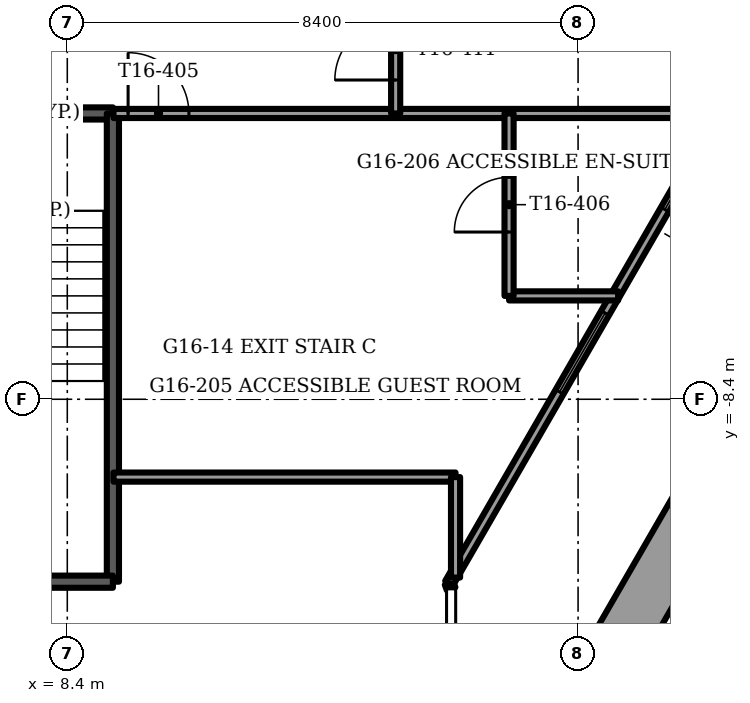
"""IFC4 building model, lengths in metres.
Left out: names, types, materials, properties, quantities, classifications, styles, units other than length and angle.
Written with IfcOpenShell. Run it as: python <this file> out.ifc"""

import sys

from ifc_helpers import new_model, si_unit, direction, frame, frame_2d, origin, place, context, subcontext, project, spatial, rectangle, extrude, element, fill, save


model = new_model("IFC4")
c1 = context("Model", 3, precision=1e-05, world=origin(), true_north=direction((0.0, 1.0)))
c2 = subcontext(c1, "Body", "Model", "MODEL_VIEW")
j1 = project(units=[si_unit("LENGTHUNIT", "METRE"), si_unit("PLANEANGLEUNIT", "RADIAN")], contexts=[c1])
p1 = place(None, origin())
s1 = spatial("IfcSite", under=j1, at=p1, CompositionType="ELEMENT")
p2 = place(p1, origin())
s2 = spatial("IfcBuilding", under=s1, at=p2, CompositionType="ELEMENT")
p3 = place(p2, frame((0.0, 0.0, 65.5)))
s3 = spatial("IfcBuildingStorey", under=s2, at=p3, CompositionType="ELEMENT", Elevation=65.5)
p4 = place(p3, frame((16.727, -13.728, 0.0), z_axis=(0.0, 0.0, 1.0), x_axis=(0.499997206141, 0.866027016814, 0.0)))
e1 = element("IfcWall", 1, at=p4, inside=s3, PredefinedType="PARAPET", context=c2, shape_type="SweptSolid", body=[
    extrude(rectangle(XDim=7.051, YDim=0.9, at=frame_2d((3.525, 0.0))), origin(), (0.0, 0.0, 1.0), 1.1),
])
p5 = place(p3, frame((14.679, -11.425, 0.0), z_axis=(0.0, 0.0, 1.0), x_axis=(0.500010091595, 0.866019577321, 0.0)))
e2 = element("IfcWall", 2, at=p5, inside=s3, PredefinedType="SOLIDWALL", context=c2, shape_type="SweptSolid", body=[
    extrude(rectangle(XDim=11.633, YDim=0.15, at=frame_2d((5.816, 0.0))), origin(), (0.0, 0.0, 1.0), 3.45),
])
p6 = place(p5, frame((3.632, 0.0, 0.15)))
e3 = element("IfcOpeningElement", 3, at=p6, cuts=e2, PredefinedType="OPENING", context=c2, shape_type="SweptSolid", body=[
    extrude(rectangle(XDim=1.5, YDim=2.2, at=frame_2d((0.75, 1.1))), frame((0.0, 0.075, 0.0), z_axis=(0.0, -1.0, 0.0), x_axis=(1.0, 0.0, 0.0)), (0.0, 0.0, 1.0), 0.15),
])
p7 = place(p5, frame((9.296, 0.0, 0.15)))
e4 = element("IfcOpeningElement", 4, at=p7, cuts=e2, PredefinedType="OPENING", context=c2, shape_type="SweptSolid", body=[
    extrude(rectangle(XDim=0.9, YDim=2.2, at=frame_2d((0.45, 1.1))), frame((0.0, 0.075, 0.0), z_axis=(0.0, -1.0, 0.0), x_axis=(1.0, 0.0, 0.0)), (0.0, 0.0, 1.0), 0.15),
])
p8 = place(p5, frame((7.096, 0.0, 0.15)))
e5 = element("IfcOpeningElement", 5, at=p8, cuts=e2, PredefinedType="OPENING", context=c2, shape_type="SweptSolid", body=[
    extrude(rectangle(XDim=1.5, YDim=2.2, at=frame_2d((0.75, 1.1))), frame((0.0, 0.075, 0.0), z_axis=(0.0, -1.0, 0.0), x_axis=(1.0, 0.0, 0.0)), (0.0, 0.0, 1.0), 0.15),
])
p9 = place(p3, frame((14.679, -11.425, 0.0), z_axis=(0.0, 0.0, 1.0), x_axis=(0.338543167143, -0.940950861619, 0.0)))
e6 = element("IfcWall", 6, at=p9, inside=s3, PredefinedType="SOLIDWALL", context=c2, shape_type="SweptSolid", body=[
    extrude(rectangle(XDim=0.098, YDim=0.15, at=frame_2d((0.049, 0.0))), origin(), (0.0, 0.0, 1.0), 3.45),
])
p10 = place(p3, frame((5.8, -3.7, -0.3), z_axis=(0.0, 0.0, 1.0), x_axis=(1.0, 0.0, 0.0)))
e7 = element("IfcWall", 7, at=p10, inside=s3, PredefinedType="SOLIDWALL", context=c2, shape_type="SweptSolid", body=[
    extrude(rectangle(XDim=3.35, YDim=0.2, at=frame_2d((1.675, 0.0))), origin(), (0.0, 0.0, 1.0), 3.75),
])
p11 = place(p10, frame((1.125, 0.0, 0.0)))
e8 = element("IfcOpeningElement", 8, at=p11, cuts=e7, PredefinedType="OPENING", context=c2, shape_type="SweptSolid", body=[
    extrude(rectangle(XDim=1.1, YDim=2.1, at=frame_2d((0.55, 1.05))), frame((0.0, 0.1, 0.0), z_axis=(0.0, -1.0, 0.0), x_axis=(1.0, 0.0, 0.0)), (0.0, 0.0, 1.0), 0.2),
])
p12 = place(p3, frame((9.15, -3.7, -0.3), z_axis=(0.0, 0.0, 1.0), x_axis=(0.0, -1.0, 0.0)))
e9 = element("IfcWall", 9, at=p12, inside=s3, PredefinedType="SOLIDWALL", context=c2, shape_type="SweptSolid", body=[
    extrude(rectangle(XDim=7.7, YDim=0.2, at=frame_2d((3.85, 0.0))), origin(), (0.0, 0.0, 1.0), 3.75),
])
p13 = place(p3, frame((5.8, -11.4, -0.3), z_axis=(0.0, 0.0, 1.0), x_axis=(1.0, 0.0, 0.0)))
e10 = element("IfcWall", 10, at=p13, inside=s3, PredefinedType="SOLIDWALL", context=c2, shape_type="SweptSolid", body=[
    extrude(rectangle(XDim=3.35, YDim=0.2, at=frame_2d((1.675, 0.0))), origin(), (0.0, 0.0, 1.0), 3.75),
])
p14 = place(p3, frame((9.16, -9.68, 0.0), z_axis=(0.0, 0.0, 1.0), x_axis=(1.0, 0.0, 0.0)))
e11 = element("IfcWall", 11, at=p14, inside=s3, PredefinedType="PARTITIONING", context=c2, shape_type="SweptSolid", body=[
    extrude(rectangle(XDim=5.625, YDim=0.15, at=frame_2d((2.812, 0.0))), origin(), (0.0, 0.0, 1.0), 3.45),
])
p15 = place(p3, frame((15.665, -6.7, 0.0), z_axis=(0.0, 0.0, 1.0), x_axis=(1.0, 0.0, 0.0)))
e12 = element("IfcWall", 12, at=p15, inside=s3, PredefinedType="PARTITIONING", context=c2, shape_type="SweptSolid", body=[
    extrude(rectangle(XDim=1.794, YDim=0.15, at=frame_2d((0.897, 0.0))), origin(), (0.0, 0.0, 1.0), 3.45),
])
p16 = place(p3, frame((9.16, -3.7, 0.0), z_axis=(0.0, 0.0, 1.0), x_axis=(1.0, 0.0, 0.0)))
e13 = element("IfcWall", 13, at=p16, inside=s3, PredefinedType="PARTITIONING", context=c2, shape_type="SweptSolid", body=[
    extrude(rectangle(XDim=10.031, YDim=0.15, at=frame_2d((5.016, 0.0))), origin(), (0.0, 0.0, 1.0), 3.45),
])
p17 = place(p16, frame((0.24, 0.0, 0.0)))
e14 = element("IfcOpeningElement", 14, at=p17, cuts=e13, PredefinedType="OPENING", context=c2, shape_type="SweptSolid", body=[
    extrude(rectangle(XDim=1.0, YDim=2.1, at=frame_2d((0.5, 1.05))), frame((0.0, 0.075, 0.0), z_axis=(0.0, -1.0, 0.0), x_axis=(1.0, 0.0, 0.0)), (0.0, 0.0, 1.0), 0.15),
])
p18 = place(p3, frame((15.665, -6.7, 0.0), z_axis=(0.0, 0.0, 1.0), x_axis=(0.0, 1.0, 0.0)))
e15 = element("IfcWall", 15, at=p18, inside=s3, PredefinedType="PARTITIONING", context=c2, shape_type="SweptSolid", body=[
    extrude(rectangle(XDim=3.0, YDim=0.15, at=frame_2d((1.5, 0.0))), origin(), (0.0, 0.0, 1.0), 3.45),
])
p19 = place(p18, frame((1.05, 0.0, 0.0)))
e16 = element("IfcOpeningElement", 16, at=p19, cuts=e15, PredefinedType="OPENING", context=c2, shape_type="SweptSolid", body=[
    extrude(rectangle(XDim=0.9, YDim=2.1, at=frame_2d((0.45, 1.05))), frame((0.0, 0.075, 0.0), z_axis=(0.0, -1.0, 0.0), x_axis=(1.0, 0.0, 0.0)), (0.0, 0.0, 1.0), 0.15),
])
p20 = place(p3, frame((14.785, -11.332, 0.0), z_axis=(0.0, 0.0, 1.0), x_axis=(0.0, 1.0, 0.0)))
e17 = element("IfcWall", 17, at=p20, inside=s3, PredefinedType="PARTITIONING", context=c2, shape_type="SweptSolid", body=[
    extrude(rectangle(XDim=1.652, YDim=0.15, at=frame_2d((0.826, 0.0))), origin(), (0.0, 0.0, 1.0), 3.45),
])
p21 = place(p3, frame((13.8, -3.7, 0.0), z_axis=(0.0, 0.0, 1.0), x_axis=(0.0, 1.0, 0.0)))
e18 = element("IfcWall", 18, at=p21, inside=s3, PredefinedType="PARTITIONING", context=c2, shape_type="SweptSolid", body=[
    extrude(rectangle(XDim=11.415, YDim=0.15, at=frame_2d((5.708, 0.0))), origin(), (0.0, 0.0, 1.0), 3.45),
])
p22 = place(p21, frame((0.55, 0.0, 0.0)))
e19 = element("IfcOpeningElement", 19, at=p22, cuts=e18, PredefinedType="OPENING", context=c2, shape_type="SweptSolid", body=[
    extrude(rectangle(XDim=1.0, YDim=2.1, at=frame_2d((0.5, 1.05))), frame((0.0, 0.075, 0.0), z_axis=(0.0, -1.0, 0.0), x_axis=(1.0, 0.0, 0.0)), (0.0, 0.0, 1.0), 0.15),
])
p23 = place(p21, frame((3.175, 0.0, 0.0)))
e20 = element("IfcOpeningElement", 20, at=p23, cuts=e18, PredefinedType="OPENING", context=c2, shape_type="SweptSolid", body=[
    extrude(rectangle(XDim=1.0, YDim=2.1, at=frame_2d((0.5, 1.05))), frame((0.0, 0.075, 0.0), z_axis=(0.0, -1.0, 0.0), x_axis=(1.0, 0.0, 0.0)), (0.0, 0.0, 1.0), 0.15),
])
p24 = place(p21, frame((7.832, 0.0, 0.0)))
e21 = element("IfcOpeningElement", 21, at=p24, cuts=e18, PredefinedType="OPENING", context=c2, shape_type="SweptSolid", body=[
    extrude(rectangle(XDim=1.0, YDim=2.1, at=frame_2d((0.5, 1.05))), frame((0.0, 0.075, 0.0), z_axis=(0.0, -1.0, 0.0), x_axis=(1.0, 0.0, 0.0)), (0.0, 0.0, 1.0), 0.15),
])
p25 = place(p6, origin())
e22 = element("IfcWindow", 22, at=p25, inside=s3, PartitioningType="SINGLE_PANEL", PredefinedType="WINDOW", context=c2, shape_type="SweptSolid", body=[
    extrude(rectangle(XDim=1.5, YDim=2.2, at=frame_2d((0.75, 1.1))), frame((0.0, 0.03, 0.0), z_axis=(0.0, -1.0, 0.0), x_axis=(1.0, 0.0, 0.0)), (0.0, 0.0, 1.0), 0.06),
])
fill(e3, e22)
p26 = place(p8, origin())
e23 = element("IfcWindow", 23, at=p26, inside=s3, PartitioningType="SINGLE_PANEL", PredefinedType="WINDOW", context=c2, shape_type="SweptSolid", body=[
    extrude(rectangle(XDim=1.5, YDim=2.2, at=frame_2d((0.75, 1.1))), frame((0.0, 0.03, 0.0), z_axis=(0.0, -1.0, 0.0), x_axis=(1.0, 0.0, 0.0)), (0.0, 0.0, 1.0), 0.06),
])
fill(e5, e23)
p27 = place(p17, origin())
e24 = element("IfcDoor", 24, at=p27, inside=s3, OperationType="SINGLE_SWING_LEFT", PredefinedType="DOOR", context=c2, shape_type="SweptSolid", body=[
    extrude(rectangle(XDim=1.0, YDim=2.1, at=frame_2d((0.5, 1.05))), frame((0.0, 0.025, 0.0), z_axis=(0.0, -1.0, 0.0), x_axis=(1.0, 0.0, 0.0)), (0.0, 0.0, 1.0), 0.05),
])
fill(e14, e24)
p28 = place(p19, origin())
e25 = element("IfcDoor", 25, at=p28, inside=s3, OperationType="SINGLE_SWING_RIGHT", PredefinedType="DOOR", context=c2, shape_type="SweptSolid", body=[
    extrude(rectangle(XDim=0.9, YDim=2.1, at=frame_2d((0.45, 1.05))), frame((0.0, 0.025, 0.0), z_axis=(0.0, -1.0, 0.0), x_axis=(1.0, 0.0, 0.0)), (0.0, 0.0, 1.0), 0.05),
])
fill(e16, e25)
p29 = place(p22, origin())
e26 = element("IfcDoor", 26, at=p29, inside=s3, OperationType="SINGLE_SWING_LEFT", PredefinedType="DOOR", context=c2, shape_type="SweptSolid", body=[
    extrude(rectangle(XDim=1.0, YDim=2.1, at=frame_2d((0.5, 1.05))), frame((0.0, 0.025, 0.0), z_axis=(0.0, -1.0, 0.0), x_axis=(1.0, 0.0, 0.0)), (0.0, 0.0, 1.0), 0.05),
])
fill(e19, e26)
save(model, sys.argv[1])
